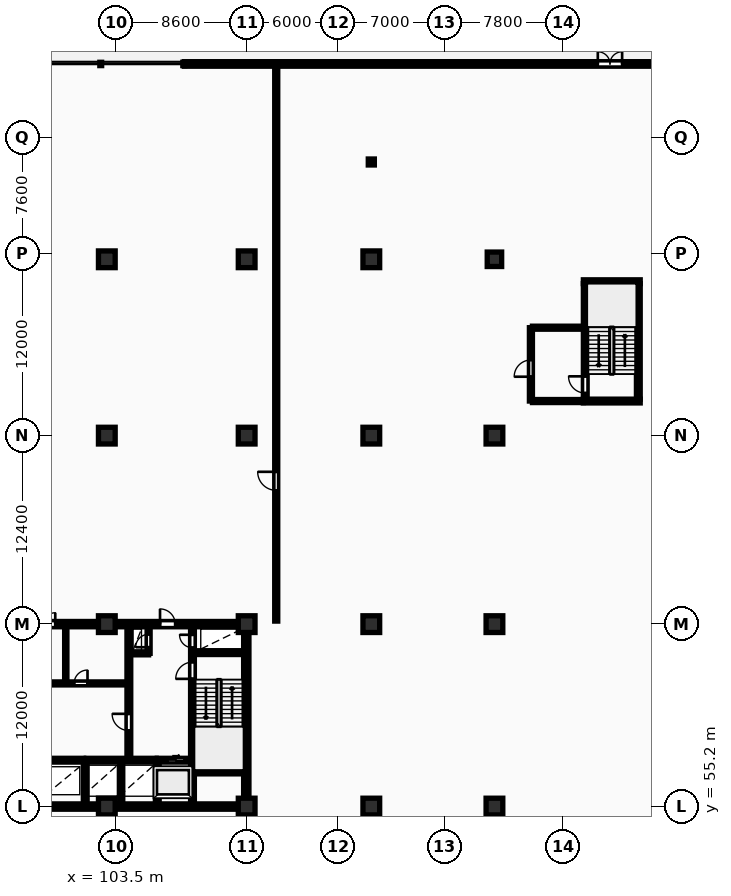
"""IFC4 building model, lengths in metres.
Left out: names, types, materials, properties, quantities, classifications, styles, units other than length and angle.
Written with IfcOpenShell. Run it as: python <this file> out.ifc"""

import sys

from ifc_helpers import new_model, si_unit, direction, frame, frame_2d, origin, origin_2d, place, context, subcontext, project, spatial, rectangle, circle, i_section, extrude, element, fill, save


model = new_model("IFC4")
c1 = context("Model", 3, precision=1e-05, world=origin(), true_north=direction((0.0, 1.0)))
c2 = subcontext(c1, "Body", "Model", "MODEL_VIEW")
j1 = project(units=[si_unit("LENGTHUNIT", "METRE"), si_unit("PLANEANGLEUNIT", "RADIAN")], contexts=[c1])
p1 = place(None, origin())
s1 = spatial("IfcSite", under=j1, at=p1, CompositionType="ELEMENT")
p2 = place(p1, origin())
s2 = spatial("IfcBuilding", under=s1, at=p2, CompositionType="ELEMENT")
p3 = place(p2, frame((0.0, 0.0, 10.0)))
s3 = spatial("IfcBuildingStorey", under=s2, at=p3, CompositionType="ELEMENT", Elevation=10.0)
for number, where, z_axis, x_axis in (
    (1, (102.9, 55.2, 0.0), (0.0, 0.0, 1.0), (1.0, 0.0, 0.0)),
    (2, (102.9, 67.2, 0.0), (0.0, 0.0, 1.0), (1.0, 0.0, 0.0)),
    (3, (102.9, 79.6, 0.0), (0.0, 0.0, 1.0), (1.0, 0.0, 0.0)),
    (4, (102.9, 91.2, 0.0), (0.0, 0.0, 1.0), (1.0, 0.0, 0.0)),
    (5, (112.1, 55.2, 0.0), (0.0, 0.0, 1.0), (1.0, 0.0, 0.0)),
    (6, (112.1, 67.2, 0.0), (0.0, 0.0, 1.0), (1.0, 0.0, 0.0)),
    (7, (112.1, 79.6, 0.0), (0.0, 0.0, 1.0), (1.0, 0.0, 0.0)),
    (8, (112.1, 91.2, 0.0), (0.0, 0.0, 1.0), (1.0, 0.0, 0.0)),
    (9, (120.3, 55.2, 0.0), (0.0, 0.0, 1.0), (1.0, 0.0, 0.0)),
    (10, (120.3, 67.2, 0.0), (0.0, 0.0, 1.0), (1.0, 0.0, 0.0)),
    (11, (120.3, 79.6, 0.0), (0.0, 0.0, 1.0), (1.0, 0.0, 0.0)),
    (12, (120.3, 91.2, 0.0), (0.0, 0.0, 1.0), (1.0, 0.0, 0.0)),
    (13, (128.4, 55.2, 0.0), (0.0, 0.0, 1.0), (1.0, 0.0, 0.0)),
    (14, (128.4, 67.2, 0.0), (0.0, 0.0, 1.0), (1.0, 0.0, 0.0)),
    (15, (128.4, 79.6, 0.0), (0.0, 0.0, 1.0), (1.0, 0.0, 0.0)),
):
    element("IfcColumn", number, at=place(p3, frame(where, z_axis=z_axis, x_axis=x_axis)), inside=s3, PredefinedType="COLUMN", context=c2, shape_type="SweptSolid", body=[
        extrude(rectangle(XDim=1.1, YDim=1.1, at=origin_2d()), origin(), (0.0, 0.0, 1.0), 4.5),
    ])
p4 = place(p3, frame((128.4, 91.2, 0.0), z_axis=(0.0, 0.0, 1.0), x_axis=(1.0, 0.0, 0.0)))
e16 = element("IfcColumn", 16, at=p4, inside=s3, PredefinedType="COLUMN", context=c2, shape_type="SweptSolid", body=[
    extrude(circle(Radius=0.475, at=origin_2d()), origin(), (0.0, 0.0, 1.0), 4.5),
])
p5 = place(p3, frame((120.3, 97.6, 0.0), z_axis=(0.0, 0.0, 1.0), x_axis=(1.0, 0.0, 0.0)))
e17 = element("IfcColumn", 17, at=p5, inside=s3, PredefinedType="COLUMN", context=c2, shape_type="SweptSolid", body=[
    extrude(i_section(OverallWidth=0.399, OverallDepth=0.394, WebThickness=0.023, FlangeThickness=0.037, FilletRadius=0.015, at=origin_2d()), origin(), (0.0, 0.0, 1.0), 4.5),
])
p6 = place(p3, frame((146.8, 104.05, 0.0), z_axis=(0.0, 0.0, 1.0), x_axis=(-1.0, 0.0, 0.0)))
e18 = element("IfcWall", 18, at=p6, inside=s3, PredefinedType="STANDARD", context=c2, shape_type="SweptSolid", body=[
    extrude(rectangle(XDim=38.8, YDim=0.3, at=frame_2d((19.4, 0.0))), origin(), (0.0, 0.0, 1.0), 4.2),
])
p7 = place(p6, frame((10.0, 0.0, 0.0)))
e19 = element("IfcOpeningElement", 19, at=p7, cuts=e18, PredefinedType="OPENING", context=c2, shape_type="SweptSolid", body=[
    extrude(rectangle(XDim=1.6, YDim=2.2, at=frame_2d((0.8, 1.1))), frame((0.0, 0.16, 0.0), z_axis=(0.0, -1.0, 0.0), x_axis=(1.0, 0.0, 0.0)), (0.0, 0.0, 1.0), 0.32),
])
p8 = place(p3, frame((75.95, 55.2, 0.0), z_axis=(0.0, 0.0, 1.0), x_axis=(1.0, 0.0, 0.0)))
e20 = element("IfcWall", 20, at=p8, inside=s3, PredefinedType="SHEAR", context=c2, shape_type="SweptSolid", body=[
    extrude(rectangle(XDim=36.3, YDim=0.35, at=frame_2d((18.15, 0.0))), origin(), (0.0, 0.0, 1.0), 4.5),
])
p9 = place(p3, frame((112.075, 55.375, 0.0), z_axis=(0.0, 0.0, 1.0), x_axis=(0.0, 1.0, 0.0)))
e21 = element("IfcWall", 21, at=p9, inside=s3, PredefinedType="SHEAR", context=c2, shape_type="SweptSolid", body=[
    extrude(rectangle(XDim=11.65, YDim=0.35, at=frame_2d((5.825, 0.0))), origin(), (0.0, 0.0, 1.0), 4.5),
])
p10 = place(p3, frame((75.95, 67.2, 0.0), z_axis=(0.0, 0.0, 1.0), x_axis=(1.0, 0.0, 0.0)))
e22 = element("IfcWall", 22, at=p10, inside=s3, PredefinedType="SHEAR", context=c2, shape_type="SweptSolid", body=[
    extrude(rectangle(XDim=36.3, YDim=0.35, at=frame_2d((18.15, 0.0))), origin(), (0.0, 0.0, 1.0), 4.5),
])
p11 = place(p10, frame((5.788, 0.0, 0.0)))
e23 = element("IfcOpeningElement", 23, at=p11, cuts=e22, PredefinedType="OPENING", context=c2, shape_type="SweptSolid", body=[
    extrude(rectangle(XDim=1.0, YDim=2.15, at=frame_2d((0.5, 1.075))), frame((0.0, 0.185, 0.0), z_axis=(0.0, -1.0, 0.0), x_axis=(1.0, 0.0, 0.0)), (0.0, 0.0, 1.0), 0.37),
])
p12 = place(p10, frame((22.058, 0.0, 0.0)))
e24 = element("IfcOpeningElement", 24, at=p12, cuts=e22, PredefinedType="OPENING", context=c2, shape_type="SweptSolid", body=[
    extrude(rectangle(XDim=1.5, YDim=2.2, at=frame_2d((0.75, 1.1))), frame((0.0, 0.185, 0.0), z_axis=(0.0, -1.0, 0.0), x_axis=(1.0, 0.0, 0.0)), (0.0, 0.0, 1.0), 0.37),
])
p13 = place(p10, frame((30.45, 0.0, 0.0)))
e25 = element("IfcOpeningElement", 25, at=p13, cuts=e22, PredefinedType="OPENING", context=c2, shape_type="SweptSolid", body=[
    extrude(rectangle(XDim=1.0, YDim=2.15, at=frame_2d((0.5, 1.075))), frame((0.0, 0.185, 0.0), z_axis=(0.0, -1.0, 0.0), x_axis=(1.0, 0.0, 0.0)), (0.0, 0.0, 1.0), 0.37),
])
p14 = place(p3, frame((93.02, 58.25, 0.0), z_axis=(0.0, 0.0, 1.0), x_axis=(1.0, 0.0, 0.0)))
e26 = element("IfcWall", 26, at=p14, inside=s3, PredefinedType="SHEAR", context=c2, shape_type="SweptSolid", body=[
    extrude(rectangle(XDim=8.36, YDim=0.25, at=frame_2d((4.18, 0.0))), origin(), (0.0, 0.0, 1.0), 4.5),
])
p15 = place(p3, frame((101.48, 55.4, 0.0), z_axis=(0.0, 0.0, 1.0), x_axis=(0.0, 1.0, 0.0)))
e27 = element("IfcWall", 27, at=p15, inside=s3, PredefinedType="SHEAR", context=c2, shape_type="SweptSolid", body=[
    extrude(rectangle(XDim=2.85, YDim=0.25, at=frame_2d((1.425, 0.0))), origin(), (0.0, 0.0, 1.0), 4.5),
])
p16 = place(p3, frame((103.85, 55.4, 0.0), z_axis=(0.0, 0.0, 1.0), x_axis=(0.0, 1.0, 0.0)))
e28 = element("IfcWall", 28, at=p16, inside=s3, PredefinedType="PARTITIONING", context=c2, shape_type="SweptSolid", body=[
    extrude(rectangle(XDim=2.72, YDim=0.2, at=frame_2d((1.36, 0.0))), origin(), (0.0, 0.0, 1.0), 4.2),
])
p17 = place(p3, frame((101.55, 58.25, 0.0), z_axis=(0.0, 0.0, 1.0), x_axis=(1.0, 0.0, 0.0)))
e29 = element("IfcWall", 29, at=p17, inside=s3, PredefinedType="SHEAR", context=c2, shape_type="SweptSolid", body=[
    extrude(rectangle(XDim=4.6, YDim=0.25, at=frame_2d((2.3, 0.0))), origin(), (0.0, 0.0, 1.0), 4.5),
])
p18 = place(p3, frame((106.22, 55.4, 0.0), z_axis=(0.0, 0.0, 1.0), x_axis=(0.0, 1.0, 0.0)))
e30 = element("IfcWall", 30, at=p18, inside=s3, PredefinedType="SHEAR", context=c2, shape_type="SweptSolid", body=[
    extrude(rectangle(XDim=2.85, YDim=0.25, at=frame_2d((1.425, 0.0))), origin(), (0.0, 0.0, 1.0), 4.5),
])
p19 = place(p3, frame((106.22, 58.25, 0.0), z_axis=(0.0, 0.0, 1.0), x_axis=(1.0, 0.0, 0.0)))
e31 = element("IfcWall", 31, at=p19, inside=s3, PredefinedType="SHEAR", context=c2, shape_type="SweptSolid", body=[
    extrude(rectangle(XDim=2.46, YDim=0.25, at=frame_2d((1.23, 0.0))), origin(), (0.0, 0.0, 1.0), 4.5),
])
p20 = place(p19, frame((0.67, 0.0, 0.0)))
e32 = element("IfcOpeningElement", 32, at=p20, cuts=e31, PredefinedType="OPENING", context=c2, shape_type="SweptSolid", body=[
    extrude(rectangle(XDim=1.12, YDim=2.12, at=frame_2d((0.56, 1.06))), frame((0.0, 0.135, 0.0), z_axis=(0.0, -1.0, 0.0), x_axis=(1.0, 0.0, 0.0)), (0.0, 0.0, 1.0), 0.27),
])
p21 = place(p3, frame((100.2, 63.4, 0.0), z_axis=(0.0, 0.0, 1.0), x_axis=(0.0, 1.0, 0.0)))
e33 = element("IfcWall", 33, at=p21, inside=s3, PredefinedType="PARTITIONING", context=c2, shape_type="SweptSolid", body=[
    extrude(rectangle(XDim=3.6, YDim=0.15, at=frame_2d((1.8, 0.0))), origin(), (0.0, 0.0, 1.0), 4.2),
])
p22 = place(p3, frame((84.42, 63.3, 0.0), z_axis=(0.0, 0.0, 1.0), x_axis=(1.0, 0.0, 0.0)))
e34 = element("IfcWall", 34, at=p22, inside=s3, PredefinedType="PARTITIONING", context=c2, shape_type="SweptSolid", body=[
    extrude(rectangle(XDim=19.83, YDim=0.2, at=frame_2d((9.915, 0.0))), origin(), (0.0, 0.0, 1.0), 4.2),
])
p23 = place(p22, frame((1.15, 0.0, 0.0)))
e35 = element("IfcOpeningElement", 35, at=p23, cuts=e34, PredefinedType="OPENING", context=c2, shape_type="SweptSolid", body=[
    extrude(rectangle(XDim=0.85, YDim=2.05, at=frame_2d((0.425, 1.025))), frame((0.0, 0.11, 0.0), z_axis=(0.0, -1.0, 0.0), x_axis=(1.0, 0.0, 0.0)), (0.0, 0.0, 1.0), 0.22),
])
p24 = place(p22, frame((3.25, 0.0, 0.0)))
e36 = element("IfcOpeningElement", 36, at=p24, cuts=e34, PredefinedType="OPENING", context=c2, shape_type="SweptSolid", body=[
    extrude(rectangle(XDim=0.85, YDim=2.05, at=frame_2d((0.425, 1.025))), frame((0.0, 0.11, 0.0), z_axis=(0.0, -1.0, 0.0), x_axis=(1.0, 0.0, 0.0)), (0.0, 0.0, 1.0), 0.22),
])
p25 = place(p22, frame((13.08, 0.0, 0.0)))
e37 = element("IfcOpeningElement", 37, at=p25, cuts=e34, PredefinedType="OPENING", context=c2, shape_type="SweptSolid", body=[
    extrude(rectangle(XDim=1.5, YDim=2.2, at=frame_2d((0.75, 1.1))), frame((0.0, 0.11, 0.0), z_axis=(0.0, -1.0, 0.0), x_axis=(1.0, 0.0, 0.0)), (0.0, 0.0, 1.0), 0.22),
])
p26 = place(p22, frame((6.68, 0.0, 0.0)))
e38 = element("IfcOpeningElement", 38, at=p26, cuts=e34, PredefinedType="OPENING", context=c2, shape_type="SweptSolid", body=[
    extrude(rectangle(XDim=0.92, YDim=2.08, at=frame_2d((0.46, 1.04))), frame((0.0, 0.11, 0.0), z_axis=(0.0, -1.0, 0.0), x_axis=(1.0, 0.0, 0.0)), (0.0, 0.0, 1.0), 0.22),
])
p27 = place(p22, frame((16.33, 0.0, 0.0)))
e39 = element("IfcOpeningElement", 39, at=p27, cuts=e34, PredefinedType="OPENING", context=c2, shape_type="SweptSolid", body=[
    extrude(rectangle(XDim=0.88, YDim=2.06, at=frame_2d((0.44, 1.03))), frame((0.0, 0.11, 0.0), z_axis=(0.0, -1.0, 0.0), x_axis=(1.0, 0.0, 0.0)), (0.0, 0.0, 1.0), 0.22),
])
p28 = place(p3, frame((104.45, 65.28, 0.0), z_axis=(0.0, 0.0, 1.0), x_axis=(1.0, 0.0, 0.0)))
e40 = element("IfcWall", 40, at=p28, inside=s3, PredefinedType="PARTITIONING", context=c2, shape_type="SweptSolid", body=[
    extrude(rectangle(XDim=1.2, YDim=0.2, at=frame_2d((0.6, 0.0))), origin(), (0.0, 0.0, 1.0), 4.2),
])
p29 = place(p3, frame((105.65, 65.28, 0.0), z_axis=(0.0, 0.0, 1.0), x_axis=(0.0, 1.0, 0.0)))
e41 = element("IfcWall", 41, at=p29, inside=s3, PredefinedType="PARTITIONING", context=c2, shape_type="SweptSolid", body=[
    extrude(rectangle(XDim=1.72, YDim=0.2, at=frame_2d((0.86, 0.0))), origin(), (0.0, 0.0, 1.0), 4.2),
])
p30 = place(p29, frame((0.4, 0.0, 0.0)))
e42 = element("IfcOpeningElement", 42, at=p30, cuts=e41, PredefinedType="OPENING", context=c2, shape_type="SweptSolid", body=[
    extrude(rectangle(XDim=0.85, YDim=2.05, at=frame_2d((0.425, 1.025))), frame((0.0, 0.11, 0.0), z_axis=(0.0, -1.0, 0.0), x_axis=(1.0, 0.0, 0.0)), (0.0, 0.0, 1.0), 0.22),
])
p31 = place(p3, frame((104.35, 58.4, 0.0), z_axis=(0.0, 0.0, 1.0), x_axis=(0.0, 1.0, 0.0)))
e43 = element("IfcWall", 43, at=p31, inside=s3, PredefinedType="SHEAR", context=c2, shape_type="SweptSolid", body=[
    extrude(rectangle(XDim=8.6, YDim=0.25, at=frame_2d((4.3, 0.0))), origin(), (0.0, 0.0, 1.0), 4.5),
])
p32 = place(p31, frame((1.8, 0.0, 0.0)))
e44 = element("IfcOpeningElement", 44, at=p32, cuts=e43, PredefinedType="OPENING", context=c2, shape_type="SweptSolid", body=[
    extrude(rectangle(XDim=1.1, YDim=2.1, at=frame_2d((0.55, 1.05))), frame((0.0, 0.135, 0.0), z_axis=(0.0, -1.0, 0.0), x_axis=(1.0, 0.0, 0.0)), (0.0, 0.0, 1.0), 0.27),
])
p33 = place(p3, frame((108.535, 55.4, 0.0), z_axis=(0.0, 0.0, 1.0), x_axis=(0.0, 1.0, 0.0)))
e45 = element("IfcWall", 45, at=p33, inside=s3, PredefinedType="SHEAR", context=c2, shape_type="SweptSolid", body=[
    extrude(rectangle(XDim=11.6, YDim=0.25, at=frame_2d((5.8, 0.0))), origin(), (0.0, 0.0, 1.0), 4.5),
])
p34 = place(p33, frame((8.2, 0.0, 0.0)))
e46 = element("IfcOpeningElement", 46, at=p34, cuts=e45, PredefinedType="OPENING", context=c2, shape_type="SweptSolid", body=[
    extrude(rectangle(XDim=1.1, YDim=2.1, at=frame_2d((0.55, 1.05))), frame((0.0, 0.135, 0.0), z_axis=(0.0, -1.0, 0.0), x_axis=(1.0, 0.0, 0.0)), (0.0, 0.0, 1.0), 0.27),
])
p35 = place(p33, frame((10.25, 0.0, 0.0)))
e47 = element("IfcOpeningElement", 47, at=p35, cuts=e45, PredefinedType="OPENING", context=c2, shape_type="SweptSolid", body=[
    extrude(rectangle(XDim=0.85, YDim=2.05, at=frame_2d((0.425, 1.025))), frame((0.0, 0.135, 0.0), z_axis=(0.0, -1.0, 0.0), x_axis=(1.0, 0.0, 0.0)), (0.0, 0.0, 1.0), 0.27),
])
for number, where, z_axis, x_axis in (
    (48, (108.66, 57.475, 0.0), (0.0, 0.0, 1.0), (1.0, 0.0, 0.0)),
    (49, (108.66, 65.325, 0.0), (0.0, 0.0, 1.0), (1.0, 0.0, 0.0)),
):
    element("IfcWall", number, at=place(p3, frame(where, z_axis=z_axis, x_axis=x_axis)), inside=s3, PredefinedType="SHEAR", context=c2, shape_type="SweptSolid", body=[
        extrude(rectangle(XDim=3.24, YDim=0.25, at=frame_2d((1.62, 0.0))), origin(), (0.0, 0.0, 1.0), 4.5),
    ])
p36 = place(p3, frame((134.375, 82.0, 0.0), z_axis=(0.0, 0.0, 1.0), x_axis=(0.0, 1.0, 0.0)))
e50 = element("IfcWall", 50, at=p36, inside=s3, PredefinedType="SHEAR", context=c2, shape_type="SweptSolid", body=[
    extrude(rectangle(XDim=7.6, YDim=0.25, at=frame_2d((3.8, 0.0))), origin(), (0.0, 0.0, 1.0), 4.5),
])
p37 = place(p36, frame((0.4, 0.0, 0.0)))
e51 = element("IfcOpeningElement", 51, at=p37, cuts=e50, PredefinedType="OPENING", context=c2, shape_type="SweptSolid", body=[
    extrude(rectangle(XDim=1.1, YDim=2.1, at=frame_2d((0.55, 1.05))), frame((0.0, 0.135, 0.0), z_axis=(0.0, -1.0, 0.0), x_axis=(1.0, 0.0, 0.0)), (0.0, 0.0, 1.0), 0.27),
])
p38 = place(p3, frame((137.865, 82.0, 0.0), z_axis=(0.0, 0.0, 1.0), x_axis=(0.0, 1.0, 0.0)))
e52 = element("IfcWall", 52, at=p38, inside=s3, PredefinedType="SHEAR", context=c2, shape_type="SweptSolid", body=[
    extrude(rectangle(XDim=7.6, YDim=0.25, at=frame_2d((3.8, 0.0))), origin(), (0.0, 0.0, 1.0), 4.5),
])
for number, where, z_axis, x_axis in (
    (53, (134.25, 81.875, 0.0), (0.0, 0.0, 1.0), (1.0, 0.0, 0.0)),
    (54, (134.25, 89.725, 0.0), (0.0, 0.0, 1.0), (1.0, 0.0, 0.0)),
):
    element("IfcWall", number, at=place(p3, frame(where, z_axis=z_axis, x_axis=x_axis)), inside=s3, PredefinedType="SHEAR", context=c2, shape_type="SweptSolid", body=[
        extrude(rectangle(XDim=3.74, YDim=0.25, at=frame_2d((1.87, 0.0))), origin(), (0.0, 0.0, 1.0), 4.5),
    ])
p39 = place(p3, frame((130.8, 81.875, 0.0), z_axis=(0.0, 0.0, 1.0), x_axis=(0.0, 1.0, 0.0)))
e55 = element("IfcWall", 55, at=p39, inside=s3, PredefinedType="PARTITIONING", context=c2, shape_type="SweptSolid", body=[
    extrude(rectangle(XDim=4.825, YDim=0.2, at=frame_2d((2.413, 0.0))), origin(), (0.0, 0.0, 1.0), 4.2),
])
p40 = place(p39, frame((1.6, 0.0, 0.0)))
e56 = element("IfcOpeningElement", 56, at=p40, cuts=e55, PredefinedType="OPENING", context=c2, shape_type="SweptSolid", body=[
    extrude(rectangle(XDim=1.1, YDim=2.15, at=frame_2d((0.55, 1.075))), frame((0.0, 0.11, 0.0), z_axis=(0.0, -1.0, 0.0), x_axis=(1.0, 0.0, 0.0)), (0.0, 0.0, 1.0), 0.22),
])
for number, where, z_axis, x_axis in (
    (57, (130.9, 81.875, 0.0), (0.0, 0.0, 1.0), (1.0, 0.0, 0.0)),
    (58, (130.9, 86.7, 0.0), (0.0, 0.0, 1.0), (1.0, 0.0, 0.0)),
):
    element("IfcWall", number, at=place(p3, frame(where, z_axis=z_axis, x_axis=x_axis)), inside=s3, PredefinedType="PARTITIONING", context=c2, shape_type="SweptSolid", body=[
        extrude(rectangle(XDim=3.35, YDim=0.2, at=frame_2d((1.675, 0.0))), origin(), (0.0, 0.0, 1.0), 4.2),
    ])
p41 = place(p3, frame((114.045, 67.4, 0.0), z_axis=(0.0, 0.0, 1.0), x_axis=(0.0, 1.0, 0.0)))
e59 = element("IfcWall", 59, at=p41, inside=s3, PredefinedType="PARTITIONING", context=c2, shape_type="SweptSolid", body=[
    extrude(rectangle(XDim=36.62, YDim=0.2, at=frame_2d((18.31, 0.0))), origin(), (0.0, 0.0, 1.0), 4.2),
])
p42 = place(p41, frame((8.6, 0.0, 0.0)))
e60 = element("IfcOpeningElement", 60, at=p42, cuts=e59, PredefinedType="OPENING", context=c2, shape_type="SweptSolid", body=[
    extrude(rectangle(XDim=1.22, YDim=2.18, at=frame_2d((0.61, 1.09))), frame((0.0, 0.11, 0.0), z_axis=(0.0, -1.0, 0.0), x_axis=(1.0, 0.0, 0.0)), (0.0, 0.0, 1.0), 0.22),
])
p43 = place(p7, frame((1.6, 0.0, 0.0), z_axis=(0.0, 0.0, 1.0), x_axis=(-1.0, 0.0, 0.0)))
e61 = element("IfcDoor", 61, at=p43, inside=s3, OperationType="DOUBLE_DOOR_SINGLE_SWING", PredefinedType="DOOR", context=c2, shape_type="SweptSolid", body=[
    extrude(rectangle(XDim=1.6, YDim=2.2, at=frame_2d((0.8, 1.1))), frame((0.0, 0.025, 0.0), z_axis=(0.0, -1.0, 0.0), x_axis=(1.0, 0.0, 0.0)), (0.0, 0.0, 1.0), 0.05),
])
fill(e19, e61)
p44 = place(p12, origin())
e62 = element("IfcDoor", 62, at=p44, inside=s3, OperationType="DOUBLE_DOOR_SINGLE_SWING", PredefinedType="DOOR", context=c2, shape_type="SweptSolid", body=[
    extrude(rectangle(XDim=1.5, YDim=2.2, at=frame_2d((0.75, 1.1))), frame((0.0, 0.025, 0.0), z_axis=(0.0, -1.0, 0.0), x_axis=(1.0, 0.0, 0.0)), (0.0, 0.0, 1.0), 0.05),
])
fill(e24, e62)
p45 = place(p13, origin())
e63 = element("IfcDoor", 63, at=p45, inside=s3, OperationType="SINGLE_SWING_LEFT", PredefinedType="DOOR", context=c2, shape_type="SweptSolid", body=[
    extrude(rectangle(XDim=1.0, YDim=2.15, at=frame_2d((0.5, 1.075))), frame((0.0, 0.025, 0.0), z_axis=(0.0, -1.0, 0.0), x_axis=(1.0, 0.0, 0.0)), (0.0, 0.0, 1.0), 0.05),
])
fill(e25, e63)
p46 = place(p20, origin())
e64 = element("IfcDoor", 64, at=p46, inside=s3, OperationType="SLIDING_TO_RIGHT", PredefinedType="DOOR", context=c2, shape_type="SweptSolid", body=[
    extrude(rectangle(XDim=1.12, YDim=2.12, at=frame_2d((0.56, 1.06))), frame((0.0, 0.025, 0.0), z_axis=(0.0, -1.0, 0.0), x_axis=(1.0, 0.0, 0.0)), (0.0, 0.0, 1.0), 0.05),
])
fill(e32, e64)
p47 = place(p27, origin())
e65 = element("IfcDoor", 65, at=p47, inside=s3, OperationType="SINGLE_SWING_RIGHT", PredefinedType="DOOR", context=c2, shape_type="SweptSolid", body=[
    extrude(rectangle(XDim=0.88, YDim=2.06, at=frame_2d((0.44, 1.03))), frame((0.0, 0.025, 0.0), z_axis=(0.0, -1.0, 0.0), x_axis=(1.0, 0.0, 0.0)), (0.0, 0.0, 1.0), 0.05),
])
fill(e39, e65)
p48 = place(p30, origin())
e66 = element("IfcDoor", 66, at=p48, inside=s3, OperationType="SINGLE_SWING_LEFT", PredefinedType="DOOR", context=c2, shape_type="SweptSolid", body=[
    extrude(rectangle(XDim=0.85, YDim=2.05, at=frame_2d((0.425, 1.025))), frame((0.0, 0.025, 0.0), z_axis=(0.0, -1.0, 0.0), x_axis=(1.0, 0.0, 0.0)), (0.0, 0.0, 1.0), 0.05),
])
fill(e42, e66)
p49 = place(p32, origin())
e67 = element("IfcDoor", 67, at=p49, inside=s3, OperationType="SINGLE_SWING_RIGHT", PredefinedType="DOOR", context=c2, shape_type="SweptSolid", body=[
    extrude(rectangle(XDim=1.1, YDim=2.1, at=frame_2d((0.55, 1.05))), frame((0.0, 0.025, 0.0), z_axis=(0.0, -1.0, 0.0), x_axis=(1.0, 0.0, 0.0)), (0.0, 0.0, 1.0), 0.05),
])
fill(e44, e67)
p50 = place(p34, origin())
e68 = element("IfcDoor", 68, at=p50, inside=s3, OperationType="SINGLE_SWING_LEFT", PredefinedType="DOOR", context=c2, shape_type="SweptSolid", body=[
    extrude(rectangle(XDim=1.1, YDim=2.1, at=frame_2d((0.55, 1.05))), frame((0.0, 0.025, 0.0), z_axis=(0.0, -1.0, 0.0), x_axis=(1.0, 0.0, 0.0)), (0.0, 0.0, 1.0), 0.05),
])
fill(e46, e68)
p51 = place(p35, origin())
e69 = element("IfcDoor", 69, at=p51, inside=s3, OperationType="SINGLE_SWING_RIGHT", PredefinedType="DOOR", context=c2, shape_type="SweptSolid", body=[
    extrude(rectangle(XDim=0.85, YDim=2.05, at=frame_2d((0.425, 1.025))), frame((0.0, 0.025, 0.0), z_axis=(0.0, -1.0, 0.0), x_axis=(1.0, 0.0, 0.0)), (0.0, 0.0, 1.0), 0.05),
])
fill(e47, e69)
p52 = place(p37, origin())
e70 = element("IfcDoor", 70, at=p52, inside=s3, OperationType="SINGLE_SWING_RIGHT", PredefinedType="DOOR", context=c2, shape_type="SweptSolid", body=[
    extrude(rectangle(XDim=1.1, YDim=2.1, at=frame_2d((0.55, 1.05))), frame((0.0, 0.025, 0.0), z_axis=(0.0, -1.0, 0.0), x_axis=(1.0, 0.0, 0.0)), (0.0, 0.0, 1.0), 0.05),
])
fill(e51, e70)
p53 = place(p40, origin())
e71 = element("IfcDoor", 71, at=p53, inside=s3, OperationType="SINGLE_SWING_LEFT", PredefinedType="DOOR", context=c2, shape_type="SweptSolid", body=[
    extrude(rectangle(XDim=1.1, YDim=2.15, at=frame_2d((0.55, 1.075))), frame((0.0, 0.025, 0.0), z_axis=(0.0, -1.0, 0.0), x_axis=(1.0, 0.0, 0.0)), (0.0, 0.0, 1.0), 0.05),
])
fill(e56, e71)
p54 = place(p42, origin())
e72 = element("IfcDoor", 72, at=p54, inside=s3, OperationType="SINGLE_SWING_RIGHT", PredefinedType="DOOR", context=c2, shape_type="SweptSolid", body=[
    extrude(rectangle(XDim=1.22, YDim=2.18, at=frame_2d((0.61, 1.09))), frame((0.0, 0.025, 0.0), z_axis=(0.0, -1.0, 0.0), x_axis=(1.0, 0.0, 0.0)), (0.0, 0.0, 1.0), 0.05),
])
fill(e60, e72)
save(model, sys.argv[1])
